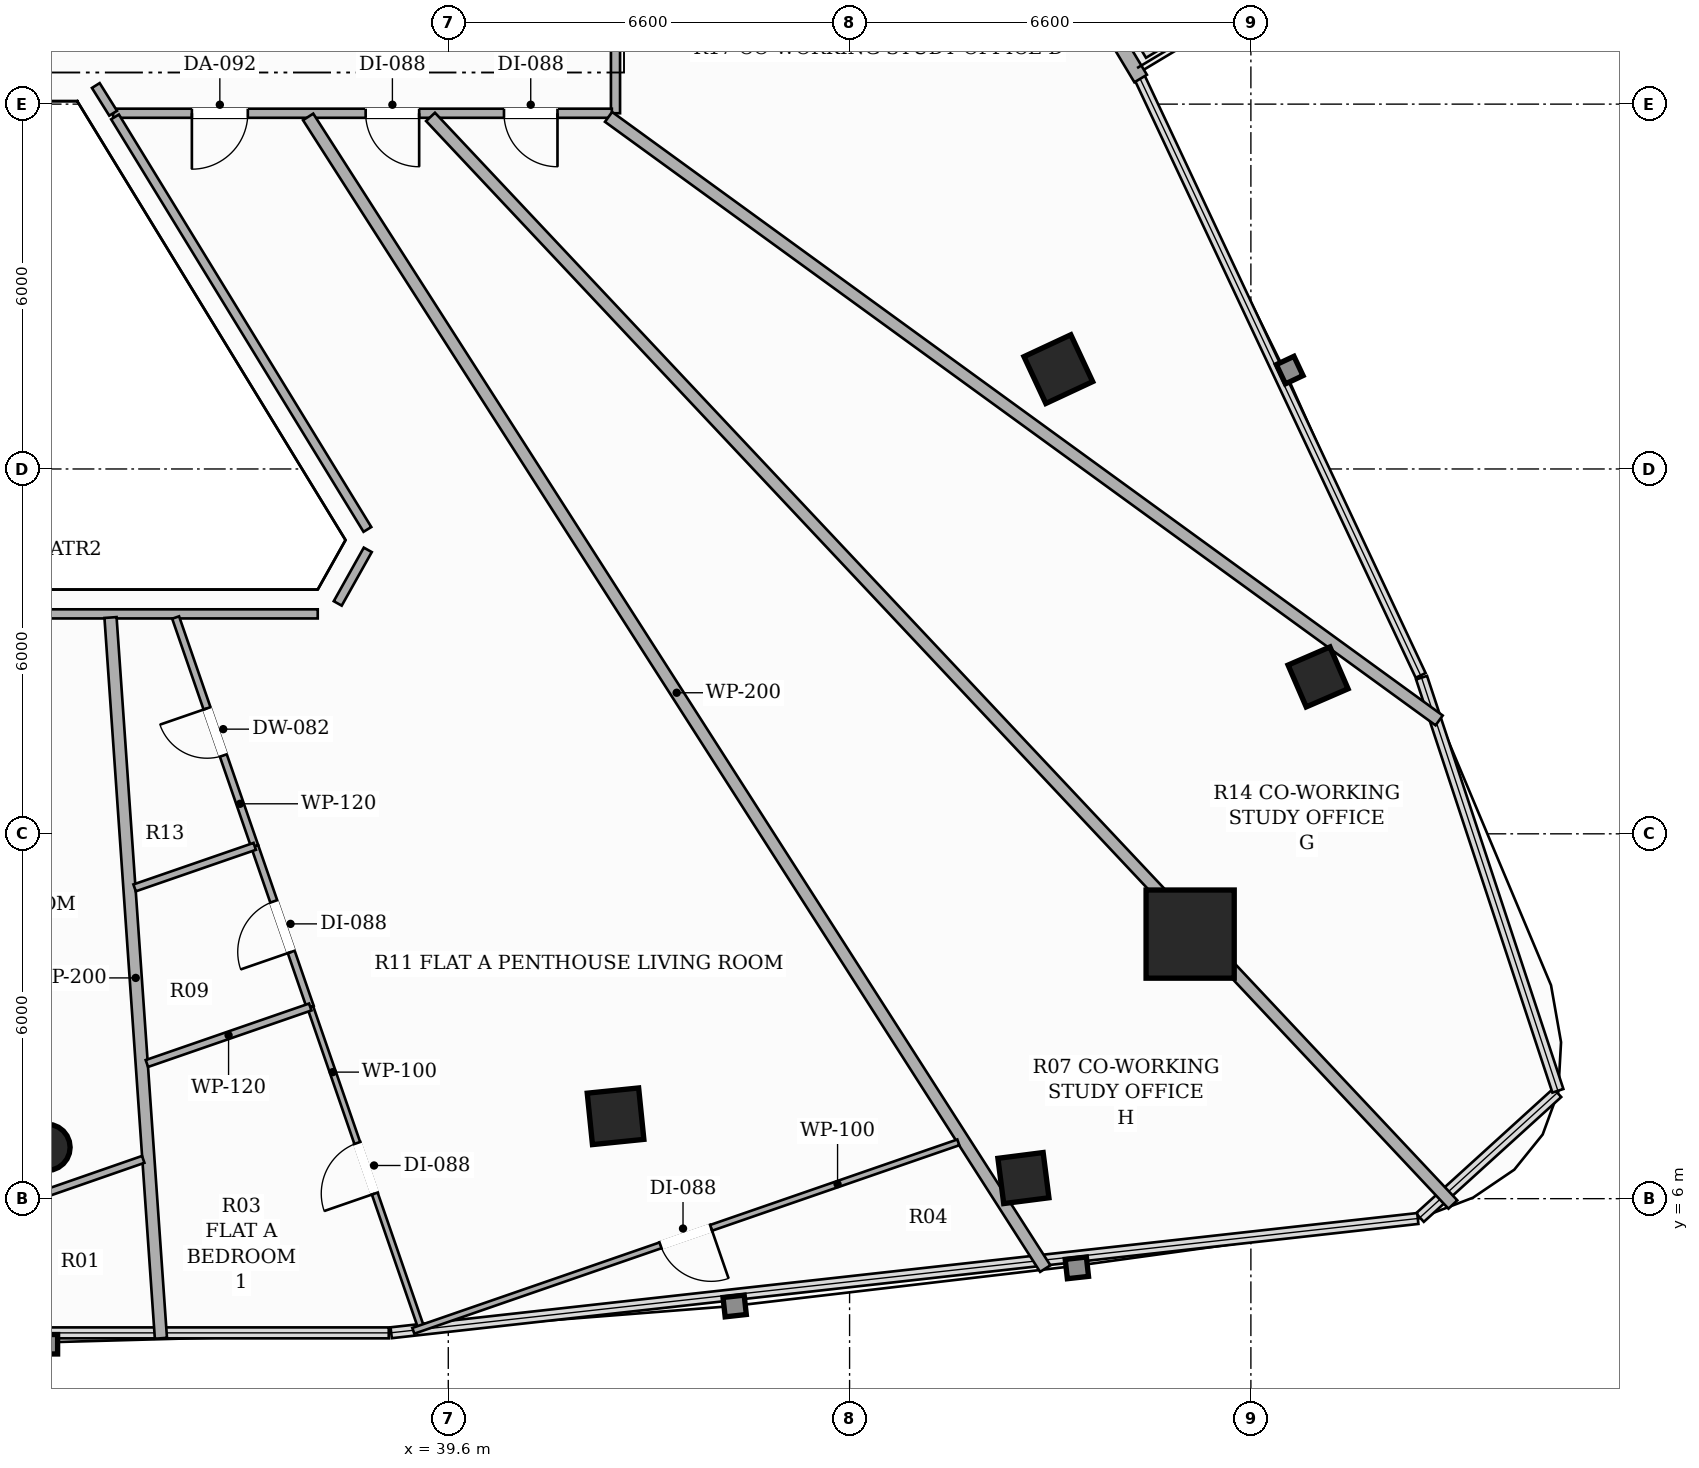
"""IFC4 building model, lengths in metres.
Left out: names, types, materials, properties, quantities, classifications, styles, units other than length and angle.
Written with IfcOpenShell. Run it as: python <this file> out.ifc"""

import sys

from ifc_helpers import new_model, si_unit, direction, frame, frame_2d, origin, origin_2d, place, context, subcontext, project, spatial, rectangle, hollow_rectangle, hollow_circle, extrude, element, fill, save


model = new_model("IFC4")
c1 = context("Model", 3, precision=1e-05, world=origin(), true_north=direction((0.0, 1.0)))
c2 = subcontext(c1, "Body", "Model", "MODEL_VIEW")
j1 = project(units=[si_unit("LENGTHUNIT", "METRE"), si_unit("PLANEANGLEUNIT", "RADIAN")], contexts=[c1])
p1 = place(None, origin())
s1 = spatial("IfcSite", under=j1, at=p1, CompositionType="ELEMENT")
p2 = place(p1, origin())
s2 = spatial("IfcBuilding", under=s1, at=p2, CompositionType="ELEMENT")
p3 = place(p2, frame((0.0, 0.0, 163.85)))
s3 = spatial("IfcBuildingStorey", under=s2, at=p3, CompositionType="ELEMENT", Elevation=163.85)
p4 = place(p3, frame((51.801, 10.351, 0.0), z_axis=(0.0, 0.0, 1.0), x_axis=(1.0, 0.0, 0.0)))
e1 = element("IfcColumn", 1, at=p4, inside=s3, PredefinedType="COLUMN", context=c2, shape_type="SweptSolid", body=[
    extrude(hollow_rectangle(XDim=1.45, YDim=1.45, WallThickness=0.045, at=origin_2d()), origin(), (0.0, 0.0, 1.0), 3.3),
])
p5 = place(p3, frame((33.0, 6.844, 0.0), z_axis=(0.0, 0.0, 1.0), x_axis=(1.0, 0.0, 0.0)))
e2 = element("IfcColumn", 2, at=p5, inside=s3, PredefinedType="COLUMN", context=c2, shape_type="SweptSolid", body=[
    extrude(hollow_circle(Radius=0.381, WallThickness=0.022, at=origin_2d()), origin(), (0.0, 0.0, 1.0), 3.3),
])
for number, where, z_axis, x_axis in (
    (3, (42.351, 7.355, 0.0), (0.0, 0.0, 1.0), (0.995, 0.101, 0.0)),
    (4, (49.633, 19.642, 0.0), (0.0, 0.0, 1.0), (-0.423, 0.906, 0.0)),
):
    element("IfcColumn", number, at=place(p3, frame(where, z_axis=z_axis, x_axis=x_axis)), inside=s3, PredefinedType="COLUMN", context=c2, shape_type="SweptSolid", body=[
        extrude(hollow_rectangle(XDim=0.85, YDim=0.85, WallThickness=0.028, at=origin_2d()), origin(), (0.0, 0.0, 1.0), 3.3),
    ])
for number, where, z_axis, x_axis in (
    (5, (49.059, 6.339, 0.0), (0.0, 0.0, 1.0), (0.992, 0.127, 0.0)),
    (6, (53.905, 14.58, 0.0), (0.0, 0.0, 1.0), (-0.397, 0.918, 0.0)),
):
    element("IfcColumn", number, at=place(p3, frame(where, z_axis=z_axis, x_axis=x_axis)), inside=s3, PredefinedType="COLUMN", context=c2, shape_type="SweptSolid", body=[
        extrude(hollow_rectangle(XDim=0.75, YDim=0.75, WallThickness=0.025, at=origin_2d()), origin(), (0.0, 0.0, 1.0), 3.3),
    ])
p6 = place(p3, frame((50.987, 24.421, 0.0), z_axis=(0.0, 0.0, 1.0), x_axis=(-0.514334017412, 0.85758994778, 0.0)))
e7 = element("IfcWall", 7, at=p6, inside=s3, PredefinedType="SOLIDWALL", context=c2, shape_type="SweptSolid", body=[
    extrude(rectangle(XDim=11.1, YDim=0.24, at=frame_2d((5.55, 0.0))), origin(), (0.0, 0.0, 1.0), 2.624),
])
p7 = place(p6, frame((8.602, 0.0, 0.0)))
e8 = element("IfcOpeningElement", 8, at=p7, cuts=e7, PredefinedType="OPENING", context=c2, shape_type="SweptSolid", body=[
    extrude(rectangle(XDim=1.8, YDim=2.2, at=frame_2d((0.9, 1.1))), frame((0.0, 0.13, 0.0), z_axis=(0.0, -1.0, 0.0), x_axis=(1.0, 0.0, 0.0)), (0.0, 0.0, 1.0), 0.26),
])
p8 = place(p3, frame((42.35, 28.34, 0.0), z_axis=(0.0, 0.0, 1.0), x_axis=(0.0, -1.0, 0.0)))
e9 = element("IfcWall", 9, at=p8, inside=s3, PredefinedType="PARTITIONING", context=c2, shape_type="SweptSolid", body=[
    extrude(rectangle(XDim=4.49, YDim=0.15, at=frame_2d((2.245, 0.0))), origin(), (0.0, 0.0, 1.0), 2.721),
])
p9 = place(p8, frame((1.805, 0.0, 0.0)))
e10 = element("IfcOpeningElement", 10, at=p9, cuts=e9, PredefinedType="OPENING", context=c2, shape_type="SweptSolid", body=[
    extrude(rectangle(XDim=0.88, YDim=2.1, at=frame_2d((0.44, 1.05))), frame((0.0, 0.085, 0.0), z_axis=(0.0, -1.0, 0.0), x_axis=(1.0, 0.0, 0.0)), (0.0, 0.0, 1.0), 0.17),
])
p10 = place(p3, frame((42.29, 23.85, 0.0), z_axis=(0.0, 0.0, 1.0), x_axis=(-1.0, 0.0, 0.0)))
e11 = element("IfcWall", 11, at=p10, inside=s3, PredefinedType="PARTITIONING", context=c2, shape_type="SweptSolid", body=[
    extrude(rectangle(XDim=8.202, YDim=0.15, at=frame_2d((4.101, 0.0))), origin(), (0.0, 0.0, 1.0), 2.492),
])
p11 = place(p10, frame((5.987, 0.0, 0.0)))
e12 = element("IfcOpeningElement", 12, at=p11, cuts=e11, PredefinedType="OPENING", context=c2, shape_type="SweptSolid", body=[
    extrude(rectangle(XDim=0.92, YDim=2.15, at=frame_2d((0.46, 1.075))), frame((0.0, 0.085, 0.0), z_axis=(0.0, -1.0, 0.0), x_axis=(1.0, 0.0, 0.0)), (0.0, 0.0, 1.0), 0.17),
])
p12 = place(p10, frame((0.894, 0.0, 0.0)))
e13 = element("IfcOpeningElement", 13, at=p12, cuts=e11, PredefinedType="OPENING", context=c2, shape_type="SweptSolid", body=[
    extrude(rectangle(XDim=0.88, YDim=2.1, at=frame_2d((0.44, 1.05))), frame((0.0, 0.085, 0.0), z_axis=(0.0, -1.0, 0.0), x_axis=(1.0, 0.0, 0.0)), (0.0, 0.0, 1.0), 0.17),
])
p13 = place(p10, frame((3.169, 0.0, 0.0)))
e14 = element("IfcOpeningElement", 14, at=p13, cuts=e11, PredefinedType="OPENING", context=c2, shape_type="SweptSolid", body=[
    extrude(rectangle(XDim=0.88, YDim=2.1, at=frame_2d((0.44, 1.05))), frame((0.0, 0.085, 0.0), z_axis=(0.0, -1.0, 0.0), x_axis=(1.0, 0.0, 0.0)), (0.0, 0.0, 1.0), 0.17),
])
p14 = place(p3, frame((34.088, 23.85, 0.0), z_axis=(0.0, 0.0, 1.0), x_axis=(-0.530039765459, 0.847972786728, 0.0)))
e15 = element("IfcWall", 15, at=p14, inside=s3, PredefinedType="PARTITIONING", context=c2, shape_type="SweptSolid", body=[
    extrude(rectangle(XDim=0.538, YDim=0.15, at=frame_2d((0.269, 0.0))), origin(), (0.0, 0.0, 1.0), 3.06),
])
p15 = place(p3, frame((34.119, 23.79, 0.0), z_axis=(0.0, 0.0, 1.0), x_axis=(0.521942869651, -0.852980445744, 0.0)))
e16 = element("IfcWall", 16, at=p15, inside=s3, PredefinedType="PARTITIONING", context=c2, shape_type="SweptSolid", body=[
    extrude(rectangle(XDim=7.953, YDim=0.15, at=frame_2d((3.977, 0.0))), origin(), (0.0, 0.0, 1.0), 2.721),
])
p16 = place(p3, frame((38.276, 16.67, 0.0), z_axis=(0.0, 0.0, 1.0), x_axis=(-0.489067077696, -0.872246177127, 0.0)))
e17 = element("IfcWall", 17, at=p16, inside=s3, PredefinedType="PARTITIONING", context=c2, shape_type="SweptSolid", body=[
    extrude(rectangle(XDim=1.01, YDim=0.15, at=frame_2d((0.505, 0.0))), origin(), (0.0, 0.0, 1.0), 3.06),
])
p17 = place(p3, frame((37.453, 15.617, 0.0), z_axis=(0.0, 0.0, 1.0), x_axis=(-1.0, 0.0, 0.0)))
e18 = element("IfcWall", 18, at=p17, inside=s3, PredefinedType="PARTITIONING", context=c2, shape_type="SweptSolid", body=[
    extrude(rectangle(XDim=8.906, YDim=0.15, at=frame_2d((4.453, 0.0))), origin(), (0.0, 0.0, 1.0), 2.721),
])
p18 = place(p3, frame((34.874, 3.704, 0.0), z_axis=(0.0, 0.0, 1.0), x_axis=(-0.069779440561, 0.997562443998, 0.0)))
e19 = element("IfcWall", 19, at=p18, inside=s3, PredefinedType="PARTITIONING", context=c2, shape_type="SweptSolid", body=[
    extrude(rectangle(XDim=11.882, YDim=0.2, at=frame_2d((5.941, 0.0))), origin(), (0.0, 0.0, 1.0), 2.413),
])
p19 = place(p3, frame((37.295, 23.79, 0.0), z_axis=(0.0, 0.0, 1.0), x_axis=(0.539100523601, -0.842241429433, 0.0)))
e20 = element("IfcWall", 20, at=p19, inside=s3, PredefinedType="PARTITIONING", context=c2, shape_type="SweptSolid", body=[
    extrude(rectangle(XDim=22.488, YDim=0.2, at=frame_2d((11.244, 0.0))), origin(), (0.0, 0.0, 1.0), 2.413),
])
p20 = place(p3, frame((55.896, 13.865, 0.0), z_axis=(0.0, 0.0, 1.0), x_axis=(-0.809001736781, 0.587806251995, 0.0)))
e21 = element("IfcWall", 21, at=p20, inside=s3, PredefinedType="PARTITIONING", context=c2, shape_type="SweptSolid", body=[
    extrude(rectangle(XDim=16.885, YDim=0.2, at=frame_2d((8.442, 0.0))), origin(), (0.0, 0.0, 1.0), 2.413),
])
p21 = place(p3, frame((56.122, 5.904, 0.0), z_axis=(0.0, 0.0, 1.0), x_axis=(-0.684934612975, 0.728604540165, 0.0)))
e22 = element("IfcWall", 22, at=p21, inside=s3, PredefinedType="PARTITIONING", context=c2, shape_type="SweptSolid", body=[
    extrude(rectangle(XDim=24.548, YDim=0.2, at=frame_2d((12.274, 0.0))), origin(), (0.0, 0.0, 1.0), 2.413),
])
p22 = place(p3, frame((36.417, 11.794, 0.0), z_axis=(0.0, 0.0, 1.0), x_axis=(-0.326767254884, 0.945104841346, 0.0)))
e23 = element("IfcWall", 23, at=p22, inside=s3, PredefinedType="PARTITIONING", context=c2, shape_type="SweptSolid", body=[
    extrude(rectangle(XDim=3.981, YDim=0.12, at=frame_2d((1.991, 0.0))), origin(), (0.0, 0.0, 1.0), 3.06),
])
p23 = place(p22, frame((1.581, 0.0, 0.0)))
e24 = element("IfcOpeningElement", 24, at=p23, cuts=e23, PredefinedType="OPENING", context=c2, shape_type="SweptSolid", body=[
    extrude(rectangle(XDim=0.82, YDim=2.1, at=frame_2d((0.41, 1.05))), frame((0.0, 0.07, 0.0), z_axis=(0.0, -1.0, 0.0), x_axis=(1.0, 0.0, 0.0)), (0.0, 0.0, 1.0), 0.14),
])
p24 = place(p3, frame((37.33, 9.152, 0.0), z_axis=(0.0, 0.0, 1.0), x_axis=(-0.326663542442, 0.945140693251, 0.0)))
e25 = element("IfcWall", 25, at=p24, inside=s3, PredefinedType="PARTITIONING", context=c2, shape_type="SweptSolid", body=[
    extrude(rectangle(XDim=2.795, YDim=0.12, at=frame_2d((1.397, 0.0))), origin(), (0.0, 0.0, 1.0), 2.721),
])
p25 = place(p24, frame((0.958, 0.0, 0.0)))
e26 = element("IfcOpeningElement", 26, at=p25, cuts=e25, PredefinedType="OPENING", context=c2, shape_type="SweptSolid", body=[
    extrude(rectangle(XDim=0.88, YDim=2.1, at=frame_2d((0.44, 1.05))), frame((0.0, 0.07, 0.0), z_axis=(0.0, -1.0, 0.0), x_axis=(1.0, 0.0, 0.0)), (0.0, 0.0, 1.0), 0.14),
])
p26 = place(p3, frame((39.164, 3.848, 0.0), z_axis=(0.0, 0.0, 1.0), x_axis=(-0.326778856457, 0.945100830056, 0.0)))
e27 = element("IfcWall", 27, at=p26, inside=s3, PredefinedType="PARTITIONING", context=c2, shape_type="SweptSolid", body=[
    extrude(rectangle(XDim=5.612, YDim=0.1, at=frame_2d((2.806, 0.0))), origin(), (0.0, 0.0, 1.0), 2.413),
])
p27 = place(p26, frame((2.366, 0.0, 0.0)))
e28 = element("IfcOpeningElement", 28, at=p27, cuts=e27, PredefinedType="OPENING", context=c2, shape_type="SweptSolid", body=[
    extrude(rectangle(XDim=0.88, YDim=2.1, at=frame_2d((0.44, 1.05))), frame((0.0, 0.06, 0.0), z_axis=(0.0, -1.0, 0.0), x_axis=(1.0, 0.0, 0.0)), (0.0, 0.0, 1.0), 0.12),
])
p28 = place(p3, frame((47.988, 6.926, 0.0), z_axis=(0.0, 0.0, 1.0), x_axis=(-0.945100175753, -0.326780748809, 0.0)))
e29 = element("IfcWall", 29, at=p28, inside=s3, PredefinedType="PARTITIONING", context=c2, shape_type="SweptSolid", body=[
    extrude(rectangle(XDim=9.484, YDim=0.1, at=frame_2d((4.742, 0.0))), origin(), (0.0, 0.0, 1.0), 2.413),
])
p29 = place(p28, frame((4.302, 0.0, 0.0)))
e30 = element("IfcOpeningElement", 30, at=p29, cuts=e29, PredefinedType="OPENING", context=c2, shape_type="SweptSolid", body=[
    extrude(rectangle(XDim=0.88, YDim=2.1, at=frame_2d((0.44, 1.05))), frame((0.0, 0.06, 0.0), z_axis=(0.0, -1.0, 0.0), x_axis=(1.0, 0.0, 0.0)), (0.0, 0.0, 1.0), 0.12),
])
p30 = place(p3, frame((36.417, 11.794, 0.0), z_axis=(0.0, 0.0, 1.0), x_axis=(-0.945158093584, -0.326613193446, 0.0)))
e31 = element("IfcWall", 31, at=p30, inside=s3, PredefinedType="PARTITIONING", context=c2, shape_type="SweptSolid", body=[
    extrude(rectangle(XDim=2.091, YDim=0.12, at=frame_2d((1.045, 0.0))), origin(), (0.0, 0.0, 1.0), 3.06),
])
p31 = place(p3, frame((37.33, 9.152, 0.0), z_axis=(0.0, 0.0, 1.0), x_axis=(-0.945086078656, -0.326821516933, 0.0)))
e32 = element("IfcWall", 32, at=p31, inside=s3, PredefinedType="PARTITIONING", context=c2, shape_type="SweptSolid", body=[
    extrude(rectangle(XDim=2.843, YDim=0.12, at=frame_2d((1.422, 0.0))), origin(), (0.0, 0.0, 1.0), 2.721),
])
p32 = place(p3, frame((34.583, 6.646, 0.0), z_axis=(0.0, 0.0, 1.0), x_axis=(-0.944539899325, -0.328396678704, 0.0)))
e33 = element("IfcWall", 33, at=p32, inside=s3, PredefinedType="PARTITIONING", context=c2, shape_type="SweptSolid", body=[
    extrude(rectangle(XDim=8.48, YDim=0.12, at=frame_2d((4.24, 0.0))), origin(), (0.0, 0.0, 1.0), 2.413),
])
p33 = place(p32, frame((3.83, 0.0, 0.0)))
e34 = element("IfcOpeningElement", 34, at=p33, cuts=e33, PredefinedType="OPENING", context=c2, shape_type="SweptSolid", body=[
    extrude(rectangle(XDim=0.82, YDim=2.1, at=frame_2d((0.41, 1.05))), frame((0.0, 0.07, 0.0), z_axis=(0.0, -1.0, 0.0), x_axis=(1.0, 0.0, 0.0)), (0.0, 0.0, 1.0), 0.14),
])
p34 = place(p11, origin())
e35 = element("IfcDoor", 35, at=p34, inside=s3, OperationType="SINGLE_SWING_RIGHT", PredefinedType="DOOR", context=c2, shape_type="SweptSolid", body=[
    extrude(rectangle(XDim=0.92, YDim=2.15, at=frame_2d((0.46, 1.075))), frame((0.0, 0.025, 0.0), z_axis=(0.0, -1.0, 0.0), x_axis=(1.0, 0.0, 0.0)), (0.0, 0.0, 1.0), 0.05),
])
fill(e12, e35)
p35 = place(p23, origin())
e36 = element("IfcDoor", 36, at=p35, inside=s3, OperationType="SINGLE_SWING_RIGHT", PredefinedType="DOOR", context=c2, shape_type="SweptSolid", body=[
    extrude(rectangle(XDim=0.82, YDim=2.1, at=frame_2d((0.41, 1.05))), frame((0.0, 0.025, 0.0), z_axis=(0.0, -1.0, 0.0), x_axis=(1.0, 0.0, 0.0)), (0.0, 0.0, 1.0), 0.05),
])
fill(e24, e36)
p36 = place(p25, origin())
e37 = element("IfcDoor", 37, at=p36, inside=s3, OperationType="SINGLE_SWING_LEFT", PredefinedType="DOOR", context=c2, shape_type="SweptSolid", body=[
    extrude(rectangle(XDim=0.88, YDim=2.1, at=frame_2d((0.44, 1.05))), frame((0.0, 0.025, 0.0), z_axis=(0.0, -1.0, 0.0), x_axis=(1.0, 0.0, 0.0)), (0.0, 0.0, 1.0), 0.05),
])
fill(e26, e37)
p37 = place(p27, origin())
e38 = element("IfcDoor", 38, at=p37, inside=s3, OperationType="SINGLE_SWING_LEFT", PredefinedType="DOOR", context=c2, shape_type="SweptSolid", body=[
    extrude(rectangle(XDim=0.88, YDim=2.1, at=frame_2d((0.44, 1.05))), frame((0.0, 0.025, 0.0), z_axis=(0.0, -1.0, 0.0), x_axis=(1.0, 0.0, 0.0)), (0.0, 0.0, 1.0), 0.05),
])
fill(e28, e38)
p38 = place(p29, origin())
e39 = element("IfcDoor", 39, at=p38, inside=s3, OperationType="SINGLE_SWING_LEFT", PredefinedType="DOOR", context=c2, shape_type="SweptSolid", body=[
    extrude(rectangle(XDim=0.88, YDim=2.1, at=frame_2d((0.44, 1.05))), frame((0.0, 0.025, 0.0), z_axis=(0.0, -1.0, 0.0), x_axis=(1.0, 0.0, 0.0)), (0.0, 0.0, 1.0), 0.05),
])
fill(e30, e39)
p39 = place(p12, origin())
e40 = element("IfcDoor", 40, at=p39, inside=s3, OperationType="SINGLE_SWING_LEFT", PredefinedType="DOOR", context=c2, shape_type="SweptSolid", body=[
    extrude(rectangle(XDim=0.88, YDim=2.1, at=frame_2d((0.44, 1.05))), frame((0.0, 0.025, 0.0), z_axis=(0.0, -1.0, 0.0), x_axis=(1.0, 0.0, 0.0)), (0.0, 0.0, 1.0), 0.05),
])
fill(e13, e40)
p40 = place(p13, origin())
e41 = element("IfcDoor", 41, at=p40, inside=s3, OperationType="SINGLE_SWING_LEFT", PredefinedType="DOOR", context=c2, shape_type="SweptSolid", body=[
    extrude(rectangle(XDim=0.88, YDim=2.1, at=frame_2d((0.44, 1.05))), frame((0.0, 0.025, 0.0), z_axis=(0.0, -1.0, 0.0), x_axis=(1.0, 0.0, 0.0)), (0.0, 0.0, 1.0), 0.05),
])
fill(e14, e41)
save(model, sys.argv[1])
